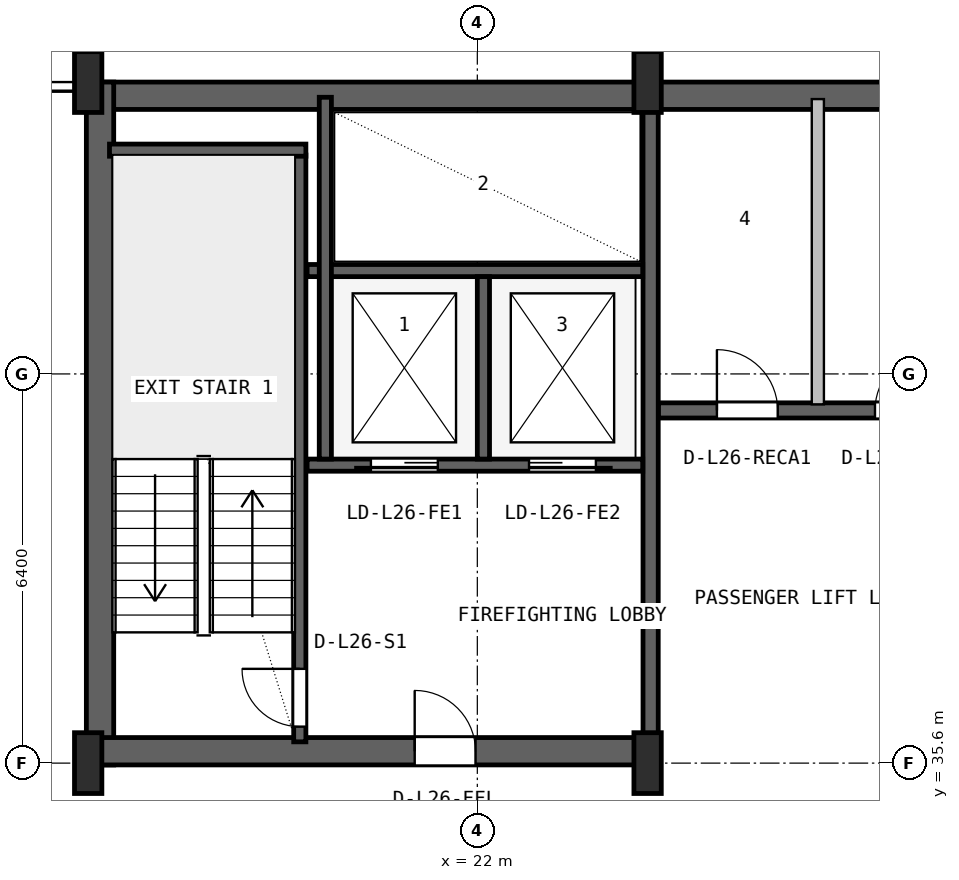
"""IFC4 building model, lengths in metres.
Left out: names, types, materials, properties, quantities, classifications, styles, units other than length and angle.
Written with IfcOpenShell. Run it as: python <this file> out.ifc"""

import sys

from ifc_helpers import new_model, si_unit, direction, frame, frame_2d, origin, origin_2d, place, context, subcontext, project, spatial, rectangle, i_section, extrude, source, transform, mapped, element, fill, save


model = new_model("IFC4")
c1 = context("Model", 3, precision=1e-05, world=origin(), true_north=direction((0.0, 1.0)))
c2 = subcontext(c1, "Body", "Model", "MODEL_VIEW")
j1 = project(units=[si_unit("LENGTHUNIT", "METRE"), si_unit("PLANEANGLEUNIT", "RADIAN")], contexts=[c1])
p1 = place(None, origin())
s1 = spatial("IfcSite", under=j1, at=p1, CompositionType="ELEMENT")
p2 = place(p1, origin())
s2 = spatial("IfcBuilding", under=s1, at=p2, CompositionType="ELEMENT")
p3 = place(p2, frame((0.0, 0.0, 110.6)))
s3 = spatial("IfcBuildingStorey", under=s2, at=p3, CompositionType="ELEMENT", Elevation=110.6)
p4 = place(p3, frame((15.6, 46.575, 0.0), z_axis=(0.0, 0.0, 1.0), x_axis=(1.0, 0.0, 0.0)))
e1 = element("IfcWall", 1, at=p4, inside=s3, PredefinedType="SHEAR", context=c2, shape_type="SweptSolid", body=[
    extrude(rectangle(XDim=36.8, YDim=0.45, at=frame_2d((18.4, 0.0))), origin(), (0.0, 0.0, 1.0), 3.55),
])
p5 = place(p3, frame((15.795, 35.57, 0.0), z_axis=(0.0, 0.0, 1.0), x_axis=(0.0, 1.0, 0.0)))
e2 = element("IfcWall", 2, at=p5, inside=s3, PredefinedType="SHEAR", context=c2, shape_type="SweptSolid", body=[
    extrude(rectangle(XDim=11.23, YDim=0.45, at=frame_2d((5.615, 0.0))), origin(), (0.0, 0.0, 1.0), 3.55),
])
p6 = place(p3, frame((15.57, 35.795, 0.0), z_axis=(0.0, 0.0, 1.0), x_axis=(1.0, 0.0, 0.0)))
e3 = element("IfcWall", 3, at=p6, inside=s3, PredefinedType="SHEAR", context=c2, shape_type="SweptSolid", body=[
    extrude(rectangle(XDim=9.23, YDim=0.45, at=frame_2d((4.615, 0.0))), origin(), (0.0, 0.0, 1.0), 3.55),
])
p7 = place(p6, frame((5.4, 0.0, 0.0)))
e4 = element("IfcOpeningElement", 4, at=p7, cuts=e3, PredefinedType="OPENING", context=c2, shape_type="SweptSolid", body=[
    extrude(rectangle(XDim=1.0, YDim=2.1, at=frame_2d((0.5, 1.05))), frame((0.0, 0.235, 0.0), z_axis=(0.0, -1.0, 0.0), x_axis=(1.0, 0.0, 0.0)), (0.0, 0.0, 1.0), 0.47),
])
m1 = source(origin(), c2, "Body", "SweptSolid", [
    extrude(i_section(OverallWidth=0.45, OverallDepth=1.0, WebThickness=0.016, FlangeThickness=0.03, FilletRadius=0.016, at=origin_2d()), origin(), (0.0, 0.0, 1.0), 3.8),
])
for number, where, z_axis, x_axis in (
    (5, (15.6, 35.6, 0.0), (0.0, 0.0, 1.0), (1.0, 0.0, 0.0)),
    (6, (15.6, 46.8, 0.0), (0.0, 0.0, 1.0), (1.0, 0.0, 0.0)),
    (7, (24.8, 35.6, 0.0), (0.0, 0.0, 1.0), (1.0, 0.0, 0.0)),
    (8, (24.8, 46.8, 0.0), (0.0, 0.0, 1.0), (1.0, 0.0, 0.0)),
):
    element("IfcColumn", number, at=place(p3, frame(where, z_axis=z_axis, x_axis=x_axis)), inside=s3, PredefinedType="COLUMN", context=c2, shape_type="MappedRepresentation", body=[
        mapped(m1, transform((0.0, 0.0, 0.0), x_axis=(1.0, 0.0, 0.0), y_axis=(0.0, 1.0, 0.0), z_axis=(0.0, 0.0, 1.0), scale=1.0)),
    ])
p8 = place(p3, frame((19.08, 35.95, 0.0), z_axis=(0.0, 0.0, 1.0), x_axis=(0.0, 1.0, 0.0)))
e9 = element("IfcWall", 9, at=p8, inside=s3, PredefinedType="SHEAR", context=c2, shape_type="SweptSolid", body=[
    extrude(rectangle(XDim=9.65, YDim=0.2, at=frame_2d((4.825, 0.0))), origin(), (0.0, 0.0, 1.0), 3.55),
])
p9 = place(p8, frame((0.25, 0.0, 0.0)))
e10 = element("IfcOpeningElement", 10, at=p9, cuts=e9, PredefinedType="OPENING", context=c2, shape_type="SweptSolid", body=[
    extrude(rectangle(XDim=0.95, YDim=2.1, at=frame_2d((0.475, 1.05))), frame((0.0, 0.11, 0.0), z_axis=(0.0, -1.0, 0.0), x_axis=(1.0, 0.0, 0.0)), (0.0, 0.0, 1.0), 0.22),
])
p10 = place(p3, frame((15.95, 45.68, 0.0), z_axis=(0.0, 0.0, 1.0), x_axis=(1.0, 0.0, 0.0)))
e11 = element("IfcWall", 11, at=p10, inside=s3, PredefinedType="SHEAR", context=c2, shape_type="SweptSolid", body=[
    extrude(rectangle(XDim=3.23, YDim=0.2, at=frame_2d((1.615, 0.0))), origin(), (0.0, 0.0, 1.0), 3.55),
])
p11 = place(p3, frame((24.85, 36.05, 0.0), z_axis=(0.0, 0.0, 1.0), x_axis=(0.0, 1.0, 0.0)))
e12 = element("IfcWall", 12, at=p11, inside=s3, PredefinedType="SHEAR", context=c2, shape_type="SweptSolid", body=[
    extrude(rectangle(XDim=10.45, YDim=0.25, at=frame_2d((5.225, 0.0))), origin(), (0.0, 0.0, 1.0), 3.55),
])
p12 = place(p3, frame((19.2, 40.5, 0.0), z_axis=(0.0, 0.0, 1.0), x_axis=(1.0, 0.0, 0.0)))
e13 = element("IfcWall", 13, at=p12, inside=s3, PredefinedType="SHEAR", context=c2, shape_type="SweptSolid", body=[
    extrude(rectangle(XDim=5.52, YDim=0.2, at=frame_2d((2.76, 0.0))), origin(), (0.0, 0.0, 1.0), 3.55),
])
p13 = place(p12, frame((1.05, 0.0, 0.0)))
e14 = element("IfcOpeningElement", 14, at=p13, cuts=e13, PredefinedType="OPENING", context=c2, shape_type="SweptSolid", body=[
    extrude(rectangle(XDim=1.1, YDim=2.18, at=frame_2d((0.55, 1.09))), frame((0.0, 0.11, 0.0), z_axis=(0.0, -1.0, 0.0), x_axis=(1.0, 0.0, 0.0)), (0.0, 0.0, 1.0), 0.22),
])
p14 = place(p12, frame((3.65, 0.0, 0.0)))
e15 = element("IfcOpeningElement", 15, at=p14, cuts=e13, PredefinedType="OPENING", context=c2, shape_type="SweptSolid", body=[
    extrude(rectangle(XDim=1.1, YDim=2.18, at=frame_2d((0.55, 1.09))), frame((0.0, 0.11, 0.0), z_axis=(0.0, -1.0, 0.0), x_axis=(1.0, 0.0, 0.0)), (0.0, 0.0, 1.0), 0.22),
])
p15 = place(p3, frame((19.2, 43.7, 0.0), z_axis=(0.0, 0.0, 1.0), x_axis=(1.0, 0.0, 0.0)))
e16 = element("IfcWall", 16, at=p15, inside=s3, PredefinedType="SHEAR", context=c2, shape_type="SweptSolid", body=[
    extrude(rectangle(XDim=5.52, YDim=0.2, at=frame_2d((2.76, 0.0))), origin(), (0.0, 0.0, 1.0), 3.55),
])
p16 = place(p3, frame((22.1, 40.6, 0.0), z_axis=(0.0, 0.0, 1.0), x_axis=(0.0, 1.0, 0.0)))
e17 = element("IfcWall", 17, at=p16, inside=s3, PredefinedType="SHEAR", context=c2, shape_type="SweptSolid", body=[
    extrude(rectangle(XDim=3.0, YDim=0.2, at=frame_2d((1.5, 0.0))), origin(), (0.0, 0.0, 1.0), 3.55),
])
p17 = place(p3, frame((19.5, 40.6, 0.0), z_axis=(0.0, 0.0, 1.0), x_axis=(0.0, 1.0, 0.0)))
e18 = element("IfcWall", 18, at=p17, inside=s3, PredefinedType="SHEAR", context=c2, shape_type="SweptSolid", body=[
    extrude(rectangle(XDim=5.95, YDim=0.2, at=frame_2d((2.975, 0.0))), origin(), (0.0, 0.0, 1.0), 3.55),
])
p18 = place(p3, frame((24.98, 41.4, 0.0), z_axis=(0.0, 0.0, 1.0), x_axis=(1.0, 0.0, 0.0)))
e19 = element("IfcWall", 19, at=p18, inside=s3, PredefinedType="SHEAR", context=c2, shape_type="SweptSolid", body=[
    extrude(rectangle(XDim=23.82, YDim=0.25, at=frame_2d((11.91, 0.0))), origin(), (0.0, 0.0, 1.0), 3.55),
])
p19 = place(p18, frame((8.87, 0.0, 0.0)))
e20 = element("IfcOpeningElement", 20, at=p19, cuts=e19, PredefinedType="OPENING", context=c2, shape_type="SweptSolid", body=[
    extrude(rectangle(XDim=1.1, YDim=2.18, at=frame_2d((0.55, 1.09))), frame((0.0, 0.135, 0.0), z_axis=(0.0, -1.0, 0.0), x_axis=(1.0, 0.0, 0.0)), (0.0, 0.0, 1.0), 0.27),
])
p20 = place(p18, frame((11.47, 0.0, 0.0)))
e21 = element("IfcOpeningElement", 21, at=p20, cuts=e19, PredefinedType="OPENING", context=c2, shape_type="SweptSolid", body=[
    extrude(rectangle(XDim=1.1, YDim=2.18, at=frame_2d((0.55, 1.09))), frame((0.0, 0.135, 0.0), z_axis=(0.0, -1.0, 0.0), x_axis=(1.0, 0.0, 0.0)), (0.0, 0.0, 1.0), 0.27),
])
p21 = place(p18, frame((14.07, 0.0, 0.0)))
e22 = element("IfcOpeningElement", 22, at=p21, cuts=e19, PredefinedType="OPENING", context=c2, shape_type="SweptSolid", body=[
    extrude(rectangle(XDim=1.1, YDim=2.18, at=frame_2d((0.55, 1.09))), frame((0.0, 0.135, 0.0), z_axis=(0.0, -1.0, 0.0), x_axis=(1.0, 0.0, 0.0)), (0.0, 0.0, 1.0), 0.27),
])
p22 = place(p18, frame((0.96, 0.0, 0.0)))
e23 = element("IfcOpeningElement", 23, at=p22, cuts=e19, PredefinedType="OPENING", context=c2, shape_type="SweptSolid", body=[
    extrude(rectangle(XDim=1.0, YDim=2.08, at=frame_2d((0.5, 1.04))), frame((0.0, 0.135, 0.0), z_axis=(0.0, -1.0, 0.0), x_axis=(1.0, 0.0, 0.0)), (0.0, 0.0, 1.0), 0.27),
])
p23 = place(p18, frame((3.56, 0.0, 0.0)))
e24 = element("IfcOpeningElement", 24, at=p23, cuts=e19, PredefinedType="OPENING", context=c2, shape_type="SweptSolid", body=[
    extrude(rectangle(XDim=1.0, YDim=2.08, at=frame_2d((0.5, 1.04))), frame((0.0, 0.135, 0.0), z_axis=(0.0, -1.0, 0.0), x_axis=(1.0, 0.0, 0.0)), (0.0, 0.0, 1.0), 0.27),
])
p24 = place(p18, frame((6.16, 0.0, 0.0)))
e25 = element("IfcOpeningElement", 25, at=p24, cuts=e19, PredefinedType="OPENING", context=c2, shape_type="SweptSolid", body=[
    extrude(rectangle(XDim=0.92, YDim=2.08, at=frame_2d((0.46, 1.04))), frame((0.0, 0.135, 0.0), z_axis=(0.0, -1.0, 0.0), x_axis=(1.0, 0.0, 0.0)), (0.0, 0.0, 1.0), 0.27),
])
p25 = place(p3, frame((27.6, 41.5, 0.0), z_axis=(0.0, 0.0, 1.0), x_axis=(0.0, 1.0, 0.0)))
e26 = element("IfcWall", 26, at=p25, inside=s3, PredefinedType="SOLIDWALL", context=c2, shape_type="SweptSolid", body=[
    extrude(rectangle(XDim=5.02, YDim=0.2, at=frame_2d((2.51, 0.0))), origin(), (0.0, 0.0, 1.0), 3.53),
])
m2 = source(origin(), c2, "Body", "SweptSolid", [
    extrude(rectangle(XDim=0.95, YDim=2.1, at=frame_2d((0.475, 1.05))), frame((0.0, 0.025, 0.0), z_axis=(0.0, -1.0, 0.0), x_axis=(1.0, 0.0, 0.0)), (0.0, 0.0, 1.0), 0.05),
])
p26 = place(p9, origin())
e27 = element("IfcDoor", 27, at=p26, inside=s3, OperationType="SINGLE_SWING_RIGHT", PredefinedType="DOOR", context=c2, shape_type="MappedRepresentation", body=[
    mapped(m2, transform((0.0, 0.0, 0.0), x_axis=(1.0, 0.0, 0.0), y_axis=(0.0, 1.0, 0.0), z_axis=(0.0, 0.0, 1.0), scale=1.0)),
])
fill(e10, e27)
m3 = source(origin(), c2, "Body", "SweptSolid", [
    extrude(rectangle(XDim=1.0, YDim=2.1, at=frame_2d((0.5, 1.05))), frame((0.0, 0.025, 0.0), z_axis=(0.0, -1.0, 0.0), x_axis=(1.0, 0.0, 0.0)), (0.0, 0.0, 1.0), 0.05),
])
p27 = place(p7, origin())
e28 = element("IfcDoor", 28, at=p27, inside=s3, OperationType="SINGLE_SWING_LEFT", PredefinedType="DOOR", context=c2, shape_type="MappedRepresentation", body=[
    mapped(m3, transform((0.0, 0.0, 0.0), x_axis=(1.0, 0.0, 0.0), y_axis=(0.0, 1.0, 0.0), z_axis=(0.0, 0.0, 1.0), scale=1.0)),
])
fill(e4, e28)
m4 = source(origin(), c2, "Body", "SweptSolid", [
    extrude(rectangle(XDim=1.1, YDim=2.18, at=frame_2d((0.55, 1.09))), frame((0.0, 0.025, 0.0), z_axis=(0.0, -1.0, 0.0), x_axis=(1.0, 0.0, 0.0)), (0.0, 0.0, 1.0), 0.05),
])
p28 = place(p13, frame((1.1, 0.0, 0.0), z_axis=(0.0, 0.0, 1.0), x_axis=(-1.0, 0.0, 0.0)))
e29 = element("IfcDoor", 29, at=p28, inside=s3, OperationType="SLIDING_TO_LEFT", PredefinedType="DOOR", context=c2, shape_type="MappedRepresentation", body=[
    mapped(m4, transform((0.0, 0.0, 0.0), x_axis=(1.0, 0.0, 0.0), y_axis=(0.0, 1.0, 0.0), z_axis=(0.0, 0.0, 1.0), scale=1.0)),
])
fill(e14, e29)
p29 = place(p14, frame((1.1, 0.0, 0.0), z_axis=(0.0, 0.0, 1.0), x_axis=(-1.0, 0.0, 0.0)))
e30 = element("IfcDoor", 30, at=p29, inside=s3, OperationType="SLIDING_TO_RIGHT", PredefinedType="DOOR", context=c2, shape_type="MappedRepresentation", body=[
    mapped(m4, transform((0.0, 0.0, 0.0), x_axis=(1.0, 0.0, 0.0), y_axis=(0.0, 1.0, 0.0), z_axis=(0.0, 0.0, 1.0), scale=1.0)),
])
fill(e15, e30)
m5 = source(origin(), c2, "Body", "SweptSolid", [
    extrude(rectangle(XDim=1.0, YDim=2.08, at=frame_2d((0.5, 1.04))), frame((0.0, 0.025, 0.0), z_axis=(0.0, -1.0, 0.0), x_axis=(1.0, 0.0, 0.0)), (0.0, 0.0, 1.0), 0.05),
])
p30 = place(p22, origin())
e31 = element("IfcDoor", 31, at=p30, inside=s3, OperationType="SINGLE_SWING_LEFT", PredefinedType="DOOR", context=c2, shape_type="MappedRepresentation", body=[
    mapped(m5, transform((0.0, 0.0, 0.0), x_axis=(1.0, 0.0, 0.0), y_axis=(0.0, 1.0, 0.0), z_axis=(0.0, 0.0, 1.0), scale=1.0)),
])
fill(e23, e31)
p31 = place(p23, origin())
e32 = element("IfcDoor", 32, at=p31, inside=s3, OperationType="SINGLE_SWING_RIGHT", PredefinedType="DOOR", context=c2, shape_type="MappedRepresentation", body=[
    mapped(m5, transform((0.0, 0.0, 0.0), x_axis=(1.0, 0.0, 0.0), y_axis=(0.0, 1.0, 0.0), z_axis=(0.0, 0.0, 1.0), scale=1.0)),
])
fill(e24, e32)
save(model, sys.argv[1])
